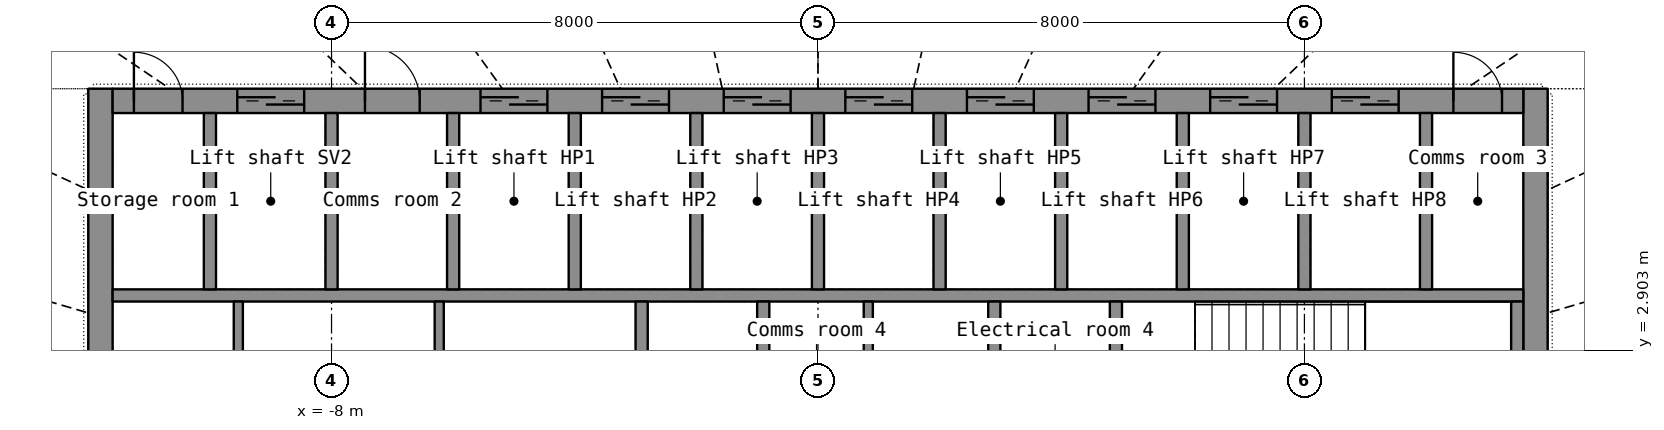
"""IFC4 building model, lengths in metres.
Left out: names, types, materials, properties, quantities, classifications, styles, units other than length and angle.
Written with IfcOpenShell. Run it as: python <this file> out.ifc"""

import sys

from ifc_helpers import new_model, si_unit, direction, frame, frame_2d, origin, place, context, subcontext, project, spatial, rectangle, extrude, element, fill, save


model = new_model("IFC4")
c1 = context("Model", 3, precision=1e-05, world=origin(), true_north=direction((0.0, 1.0)))
c2 = subcontext(c1, "Body", "Model", "MODEL_VIEW")
j1 = project(units=[si_unit("LENGTHUNIT", "METRE"), si_unit("PLANEANGLEUNIT", "RADIAN")], contexts=[c1])
p1 = place(None, origin())
s1 = spatial("IfcSite", under=j1, at=p1, CompositionType="ELEMENT")
p2 = place(p1, origin())
s2 = spatial("IfcBuilding", under=s1, at=p2, CompositionType="ELEMENT")
p3 = place(p2, frame((0.0, 0.0, 224.5)))
s3 = spatial("IfcBuildingStorey", under=s2, at=p3, CompositionType="ELEMENT", Elevation=224.5)
p4 = place(p3, frame((-11.8, -7.2, 0.0), z_axis=(0.0, 0.0, 1.0), x_axis=(0.0, 1.0, 0.0)))
e1 = element("IfcWall", 1, at=p4, inside=s3, PredefinedType="SHEAR", context=c2, shape_type="SweptSolid", body=[
    extrude(rectangle(XDim=14.4, YDim=0.4, at=frame_2d((7.2, 0.0))), origin(), (0.0, 0.0, 1.0), 3.3),
])
p5 = place(p4, frame((6.5, 0.0, 0.0)))
e2 = element("IfcOpeningElement", 2, at=p5, cuts=e1, PredefinedType="OPENING", context=c2, shape_type="SweptSolid", body=[
    extrude(rectangle(XDim=1.4, YDim=2.2, at=frame_2d((0.7, 1.1))), frame((0.0, 0.21, 0.0), z_axis=(0.0, -1.0, 0.0), x_axis=(1.0, 0.0, 0.0)), (0.0, 0.0, 1.0), 0.42),
])
p6 = place(p3, frame((11.8, -7.2, 0.0), z_axis=(0.0, 0.0, 1.0), x_axis=(0.0, 1.0, 0.0)))
e3 = element("IfcWall", 3, at=p6, inside=s3, PredefinedType="SHEAR", context=c2, shape_type="SweptSolid", body=[
    extrude(rectangle(XDim=14.4, YDim=0.4, at=frame_2d((7.2, 0.0))), origin(), (0.0, 0.0, 1.0), 3.3),
])
p7 = place(p6, frame((6.5, 0.0, 0.0)))
e4 = element("IfcOpeningElement", 4, at=p7, cuts=e3, PredefinedType="OPENING", context=c2, shape_type="SweptSolid", body=[
    extrude(rectangle(XDim=1.4, YDim=2.2, at=frame_2d((0.7, 1.1))), frame((0.0, 0.21, 0.0), z_axis=(0.0, -1.0, 0.0), x_axis=(1.0, 0.0, 0.0)), (0.0, 0.0, 1.0), 0.42),
])
p8 = place(p3, frame((-11.6, 7.0, 0.0), z_axis=(0.0, 0.0, 1.0), x_axis=(1.0, 0.0, 0.0)))
e5 = element("IfcWall", 5, at=p8, inside=s3, PredefinedType="SHEAR", context=c2, shape_type="SweptSolid", body=[
    extrude(rectangle(XDim=23.2, YDim=0.4, at=frame_2d((11.6, 0.0))), origin(), (0.0, 0.0, 1.0), 3.3),
])
p9 = place(p8, frame((2.05, 0.0, 0.0)))
e6 = element("IfcOpeningElement", 6, at=p9, cuts=e5, PredefinedType="OPENING", context=c2, shape_type="SweptSolid", body=[
    extrude(rectangle(XDim=1.1, YDim=2.2, at=frame_2d((0.55, 1.1))), frame((0.0, 0.21, 0.0), z_axis=(0.0, -1.0, 0.0), x_axis=(1.0, 0.0, 0.0)), (0.0, 0.0, 1.0), 0.42),
])
p10 = place(p8, frame((6.05, 0.0, 0.0)))
e7 = element("IfcOpeningElement", 7, at=p10, cuts=e5, PredefinedType="OPENING", context=c2, shape_type="SweptSolid", body=[
    extrude(rectangle(XDim=1.1, YDim=2.2, at=frame_2d((0.55, 1.1))), frame((0.0, 0.21, 0.0), z_axis=(0.0, -1.0, 0.0), x_axis=(1.0, 0.0, 0.0)), (0.0, 0.0, 1.0), 0.42),
])
p11 = place(p8, frame((8.05, 0.0, 0.0)))
e8 = element("IfcOpeningElement", 8, at=p11, cuts=e5, PredefinedType="OPENING", context=c2, shape_type="SweptSolid", body=[
    extrude(rectangle(XDim=1.1, YDim=2.2, at=frame_2d((0.55, 1.1))), frame((0.0, 0.21, 0.0), z_axis=(0.0, -1.0, 0.0), x_axis=(1.0, 0.0, 0.0)), (0.0, 0.0, 1.0), 0.42),
])
p12 = place(p8, frame((10.05, 0.0, 0.0)))
e9 = element("IfcOpeningElement", 9, at=p12, cuts=e5, PredefinedType="OPENING", context=c2, shape_type="SweptSolid", body=[
    extrude(rectangle(XDim=1.1, YDim=2.2, at=frame_2d((0.55, 1.1))), frame((0.0, 0.21, 0.0), z_axis=(0.0, -1.0, 0.0), x_axis=(1.0, 0.0, 0.0)), (0.0, 0.0, 1.0), 0.42),
])
p13 = place(p8, frame((12.05, 0.0, 0.0)))
e10 = element("IfcOpeningElement", 10, at=p13, cuts=e5, PredefinedType="OPENING", context=c2, shape_type="SweptSolid", body=[
    extrude(rectangle(XDim=1.1, YDim=2.2, at=frame_2d((0.55, 1.1))), frame((0.0, 0.21, 0.0), z_axis=(0.0, -1.0, 0.0), x_axis=(1.0, 0.0, 0.0)), (0.0, 0.0, 1.0), 0.42),
])
p14 = place(p8, frame((14.05, 0.0, 0.0)))
e11 = element("IfcOpeningElement", 11, at=p14, cuts=e5, PredefinedType="OPENING", context=c2, shape_type="SweptSolid", body=[
    extrude(rectangle(XDim=1.1, YDim=2.2, at=frame_2d((0.55, 1.1))), frame((0.0, 0.21, 0.0), z_axis=(0.0, -1.0, 0.0), x_axis=(1.0, 0.0, 0.0)), (0.0, 0.0, 1.0), 0.42),
])
p15 = place(p8, frame((16.05, 0.0, 0.0)))
e12 = element("IfcOpeningElement", 12, at=p15, cuts=e5, PredefinedType="OPENING", context=c2, shape_type="SweptSolid", body=[
    extrude(rectangle(XDim=1.1, YDim=2.2, at=frame_2d((0.55, 1.1))), frame((0.0, 0.21, 0.0), z_axis=(0.0, -1.0, 0.0), x_axis=(1.0, 0.0, 0.0)), (0.0, 0.0, 1.0), 0.42),
])
p16 = place(p8, frame((18.05, 0.0, 0.0)))
e13 = element("IfcOpeningElement", 13, at=p16, cuts=e5, PredefinedType="OPENING", context=c2, shape_type="SweptSolid", body=[
    extrude(rectangle(XDim=1.1, YDim=2.2, at=frame_2d((0.55, 1.1))), frame((0.0, 0.21, 0.0), z_axis=(0.0, -1.0, 0.0), x_axis=(1.0, 0.0, 0.0)), (0.0, 0.0, 1.0), 0.42),
])
p17 = place(p8, frame((20.05, 0.0, 0.0)))
e14 = element("IfcOpeningElement", 14, at=p17, cuts=e5, PredefinedType="OPENING", context=c2, shape_type="SweptSolid", body=[
    extrude(rectangle(XDim=1.1, YDim=2.2, at=frame_2d((0.55, 1.1))), frame((0.0, 0.21, 0.0), z_axis=(0.0, -1.0, 0.0), x_axis=(1.0, 0.0, 0.0)), (0.0, 0.0, 1.0), 0.42),
])
p18 = place(p8, frame((4.15, 0.0, 0.0)))
e15 = element("IfcOpeningElement", 15, at=p18, cuts=e5, PredefinedType="OPENING", context=c2, shape_type="SweptSolid", body=[
    extrude(rectangle(XDim=0.9, YDim=2.1, at=frame_2d((0.45, 1.05))), frame((0.0, 0.21, 0.0), z_axis=(0.0, -1.0, 0.0), x_axis=(1.0, 0.0, 0.0)), (0.0, 0.0, 1.0), 0.42),
])
p19 = place(p8, frame((0.35, 0.0, 0.0)))
e16 = element("IfcOpeningElement", 16, at=p19, cuts=e5, PredefinedType="OPENING", context=c2, shape_type="SweptSolid", body=[
    extrude(rectangle(XDim=0.8, YDim=2.05, at=frame_2d((0.4, 1.025))), frame((0.0, 0.21, 0.0), z_axis=(0.0, -1.0, 0.0), x_axis=(1.0, 0.0, 0.0)), (0.0, 0.0, 1.0), 0.42),
])
p20 = place(p8, frame((22.05, 0.0, 0.0)))
e17 = element("IfcOpeningElement", 17, at=p20, cuts=e5, PredefinedType="OPENING", context=c2, shape_type="SweptSolid", body=[
    extrude(rectangle(XDim=0.8, YDim=2.05, at=frame_2d((0.4, 1.025))), frame((0.0, 0.21, 0.0), z_axis=(0.0, -1.0, 0.0), x_axis=(1.0, 0.0, 0.0)), (0.0, 0.0, 1.0), 0.42),
])
p21 = place(p3, frame((-11.6, 3.8, 0.0), z_axis=(0.0, 0.0, 1.0), x_axis=(1.0, 0.0, 0.0)))
e18 = element("IfcWall", 18, at=p21, inside=s3, PredefinedType="SHEAR", context=c2, shape_type="SweptSolid", body=[
    extrude(rectangle(XDim=23.2, YDim=0.2, at=frame_2d((11.6, 0.0))), origin(), (0.0, 0.0, 1.0), 3.3),
])
for number, where, z_axis, x_axis in (
    (19, (-10.0, 3.9, 0.0), (0.0, 0.0, 1.0), (0.0, 1.0, 0.0)),
    (20, (-8.0, 3.9, 0.0), (0.0, 0.0, 1.0), (0.0, 1.0, 0.0)),
    (21, (-6.0, 3.9, 0.0), (0.0, 0.0, 1.0), (0.0, 1.0, 0.0)),
    (22, (-4.0, 3.9, 0.0), (0.0, 0.0, 1.0), (0.0, 1.0, 0.0)),
    (23, (-2.0, 3.9, 0.0), (0.0, 0.0, 1.0), (0.0, 1.0, 0.0)),
    (24, (0.0, 3.9, 0.0), (0.0, 0.0, 1.0), (0.0, 1.0, 0.0)),
    (25, (2.0, 3.9, 0.0), (0.0, 0.0, 1.0), (0.0, 1.0, 0.0)),
    (26, (4.0, 3.9, 0.0), (0.0, 0.0, 1.0), (0.0, 1.0, 0.0)),
    (27, (6.0, 3.9, 0.0), (0.0, 0.0, 1.0), (0.0, 1.0, 0.0)),
    (28, (8.0, 3.9, 0.0), (0.0, 0.0, 1.0), (0.0, 1.0, 0.0)),
    (29, (10.0, 3.9, 0.0), (0.0, 0.0, 1.0), (0.0, 1.0, 0.0)),
):
    element("IfcWall", number, at=place(p3, frame(where, z_axis=z_axis, x_axis=x_axis)), inside=s3, PredefinedType="SHEAR", context=c2, shape_type="SweptSolid", body=[
        extrude(rectangle(XDim=2.9, YDim=0.2, at=frame_2d((1.45, 0.0))), origin(), (0.0, 0.0, 1.0), 3.3),
    ])
p22 = place(p3, frame((-2.9, -3.7, 0.0), z_axis=(0.0, 0.0, 1.0), x_axis=(0.0, 1.0, 0.0)))
e30 = element("IfcWall", 30, at=p22, inside=s3, PredefinedType="SHEAR", context=c2, shape_type="SweptSolid", body=[
    extrude(rectangle(XDim=7.4, YDim=0.2, at=frame_2d((3.7, 0.0))), origin(), (0.0, 0.0, 1.0), 3.3),
])
p23 = place(p22, frame((3.1, 0.0, 0.0)))
e31 = element("IfcOpeningElement", 31, at=p23, cuts=e30, PredefinedType="OPENING", context=c2, shape_type="SweptSolid", body=[
    extrude(rectangle(XDim=1.2, YDim=2.2, at=frame_2d((0.6, 1.1))), frame((0.0, 0.11, 0.0), z_axis=(0.0, -1.0, 0.0), x_axis=(1.0, 0.0, 0.0)), (0.0, 0.0, 1.0), 0.22),
])
p24 = place(p3, frame((2.9, -3.7, 0.0), z_axis=(0.0, 0.0, 1.0), x_axis=(0.0, 1.0, 0.0)))
e32 = element("IfcWall", 32, at=p24, inside=s3, PredefinedType="SHEAR", context=c2, shape_type="SweptSolid", body=[
    extrude(rectangle(XDim=7.4, YDim=0.2, at=frame_2d((3.7, 0.0))), origin(), (0.0, 0.0, 1.0), 3.3),
])
p25 = place(p24, frame((3.1, 0.0, 0.0)))
e33 = element("IfcOpeningElement", 33, at=p25, cuts=e32, PredefinedType="OPENING", context=c2, shape_type="SweptSolid", body=[
    extrude(rectangle(XDim=1.2, YDim=2.2, at=frame_2d((0.6, 1.1))), frame((0.0, 0.11, 0.0), z_axis=(0.0, -1.0, 0.0), x_axis=(1.0, 0.0, 0.0)), (0.0, 0.0, 1.0), 0.22),
])
for number, where, z_axis, x_axis in (
    (34, (-0.9, 1.35, 0.0), (0.0, 0.0, 1.0), (0.0, 1.0, 0.0)),
    (35, (11.5, 1.35, 0.0), (0.0, 0.0, 1.0), (0.0, 1.0, 0.0)),
    (36, (4.9, 1.35, 0.0), (0.0, 0.0, 1.0), (0.0, 1.0, 0.0)),
):
    element("IfcWall", number, at=place(p3, frame(where, z_axis=z_axis, x_axis=x_axis)), inside=s3, PredefinedType="SHEAR", context=c2, shape_type="SweptSolid", body=[
        extrude(rectangle(XDim=2.35, YDim=0.2, at=frame_2d((1.175, 0.0))), origin(), (0.0, 0.0, 1.0), 3.3),
    ])
for number, where, z_axis, x_axis in (
    (37, (-9.533, 1.35, 0.0), (0.0, 0.0, 1.0), (0.0, 1.0, 0.0)),
    (38, (-6.229, 1.35, 0.0), (0.0, 0.0, 1.0), (0.0, 1.0, 0.0)),
    (39, (0.827, 1.35, 0.0), (0.0, 0.0, 1.0), (0.0, 1.0, 0.0)),
):
    element("IfcWall", number, at=place(p3, frame(where, z_axis=z_axis, x_axis=x_axis)), inside=s3, PredefinedType="PARTITIONING", context=c2, shape_type="SweptSolid", body=[
        extrude(rectangle(XDim=2.35, YDim=0.15, at=frame_2d((1.175, 0.0))), origin(), (0.0, 0.0, 1.0), 3.3),
    ])
p26 = place(p9, origin())
e40 = element("IfcDoor", 40, at=p26, inside=s3, OperationType="DOUBLE_DOOR_SLIDING", PredefinedType="DOOR", context=c2, shape_type="SweptSolid", body=[
    extrude(rectangle(XDim=1.1, YDim=2.2, at=frame_2d((0.55, 1.1))), frame((0.0, 0.025, 0.0), z_axis=(0.0, -1.0, 0.0), x_axis=(1.0, 0.0, 0.0)), (0.0, 0.0, 1.0), 0.05),
])
fill(e6, e40)
p27 = place(p10, origin())
e41 = element("IfcDoor", 41, at=p27, inside=s3, OperationType="DOUBLE_DOOR_SLIDING", PredefinedType="DOOR", context=c2, shape_type="SweptSolid", body=[
    extrude(rectangle(XDim=1.1, YDim=2.2, at=frame_2d((0.55, 1.1))), frame((0.0, 0.025, 0.0), z_axis=(0.0, -1.0, 0.0), x_axis=(1.0, 0.0, 0.0)), (0.0, 0.0, 1.0), 0.05),
])
fill(e7, e41)
p28 = place(p11, origin())
e42 = element("IfcDoor", 42, at=p28, inside=s3, OperationType="DOUBLE_DOOR_SLIDING", PredefinedType="DOOR", context=c2, shape_type="SweptSolid", body=[
    extrude(rectangle(XDim=1.1, YDim=2.2, at=frame_2d((0.55, 1.1))), frame((0.0, 0.025, 0.0), z_axis=(0.0, -1.0, 0.0), x_axis=(1.0, 0.0, 0.0)), (0.0, 0.0, 1.0), 0.05),
])
fill(e8, e42)
p29 = place(p12, origin())
e43 = element("IfcDoor", 43, at=p29, inside=s3, OperationType="DOUBLE_DOOR_SLIDING", PredefinedType="DOOR", context=c2, shape_type="SweptSolid", body=[
    extrude(rectangle(XDim=1.1, YDim=2.2, at=frame_2d((0.55, 1.1))), frame((0.0, 0.025, 0.0), z_axis=(0.0, -1.0, 0.0), x_axis=(1.0, 0.0, 0.0)), (0.0, 0.0, 1.0), 0.05),
])
fill(e9, e43)
p30 = place(p13, origin())
e44 = element("IfcDoor", 44, at=p30, inside=s3, OperationType="DOUBLE_DOOR_SLIDING", PredefinedType="DOOR", context=c2, shape_type="SweptSolid", body=[
    extrude(rectangle(XDim=1.1, YDim=2.2, at=frame_2d((0.55, 1.1))), frame((0.0, 0.025, 0.0), z_axis=(0.0, -1.0, 0.0), x_axis=(1.0, 0.0, 0.0)), (0.0, 0.0, 1.0), 0.05),
])
fill(e10, e44)
p31 = place(p14, origin())
e45 = element("IfcDoor", 45, at=p31, inside=s3, OperationType="DOUBLE_DOOR_SLIDING", PredefinedType="DOOR", context=c2, shape_type="SweptSolid", body=[
    extrude(rectangle(XDim=1.1, YDim=2.2, at=frame_2d((0.55, 1.1))), frame((0.0, 0.025, 0.0), z_axis=(0.0, -1.0, 0.0), x_axis=(1.0, 0.0, 0.0)), (0.0, 0.0, 1.0), 0.05),
])
fill(e11, e45)
p32 = place(p15, origin())
e46 = element("IfcDoor", 46, at=p32, inside=s3, OperationType="DOUBLE_DOOR_SLIDING", PredefinedType="DOOR", context=c2, shape_type="SweptSolid", body=[
    extrude(rectangle(XDim=1.1, YDim=2.2, at=frame_2d((0.55, 1.1))), frame((0.0, 0.025, 0.0), z_axis=(0.0, -1.0, 0.0), x_axis=(1.0, 0.0, 0.0)), (0.0, 0.0, 1.0), 0.05),
])
fill(e12, e46)
p33 = place(p16, origin())
e47 = element("IfcDoor", 47, at=p33, inside=s3, OperationType="DOUBLE_DOOR_SLIDING", PredefinedType="DOOR", context=c2, shape_type="SweptSolid", body=[
    extrude(rectangle(XDim=1.1, YDim=2.2, at=frame_2d((0.55, 1.1))), frame((0.0, 0.025, 0.0), z_axis=(0.0, -1.0, 0.0), x_axis=(1.0, 0.0, 0.0)), (0.0, 0.0, 1.0), 0.05),
])
fill(e13, e47)
p34 = place(p17, origin())
e48 = element("IfcDoor", 48, at=p34, inside=s3, OperationType="DOUBLE_DOOR_SLIDING", PredefinedType="DOOR", context=c2, shape_type="SweptSolid", body=[
    extrude(rectangle(XDim=1.1, YDim=2.2, at=frame_2d((0.55, 1.1))), frame((0.0, 0.025, 0.0), z_axis=(0.0, -1.0, 0.0), x_axis=(1.0, 0.0, 0.0)), (0.0, 0.0, 1.0), 0.05),
])
fill(e14, e48)
p35 = place(p18, origin())
e49 = element("IfcDoor", 49, at=p35, inside=s3, OperationType="SINGLE_SWING_LEFT", PredefinedType="DOOR", context=c2, shape_type="SweptSolid", body=[
    extrude(rectangle(XDim=0.9, YDim=2.1, at=frame_2d((0.45, 1.05))), frame((0.0, 0.025, 0.0), z_axis=(0.0, -1.0, 0.0), x_axis=(1.0, 0.0, 0.0)), (0.0, 0.0, 1.0), 0.05),
])
fill(e15, e49)
p36 = place(p19, origin())
e50 = element("IfcDoor", 50, at=p36, inside=s3, OperationType="SINGLE_SWING_LEFT", PredefinedType="DOOR", context=c2, shape_type="SweptSolid", body=[
    extrude(rectangle(XDim=0.8, YDim=2.05, at=frame_2d((0.4, 1.025))), frame((0.0, 0.025, 0.0), z_axis=(0.0, -1.0, 0.0), x_axis=(1.0, 0.0, 0.0)), (0.0, 0.0, 1.0), 0.05),
])
fill(e16, e50)
p37 = place(p20, origin())
e51 = element("IfcDoor", 51, at=p37, inside=s3, OperationType="SINGLE_SWING_LEFT", PredefinedType="DOOR", context=c2, shape_type="SweptSolid", body=[
    extrude(rectangle(XDim=0.8, YDim=2.05, at=frame_2d((0.4, 1.025))), frame((0.0, 0.025, 0.0), z_axis=(0.0, -1.0, 0.0), x_axis=(1.0, 0.0, 0.0)), (0.0, 0.0, 1.0), 0.05),
])
fill(e17, e51)
save(model, sys.argv[1])
